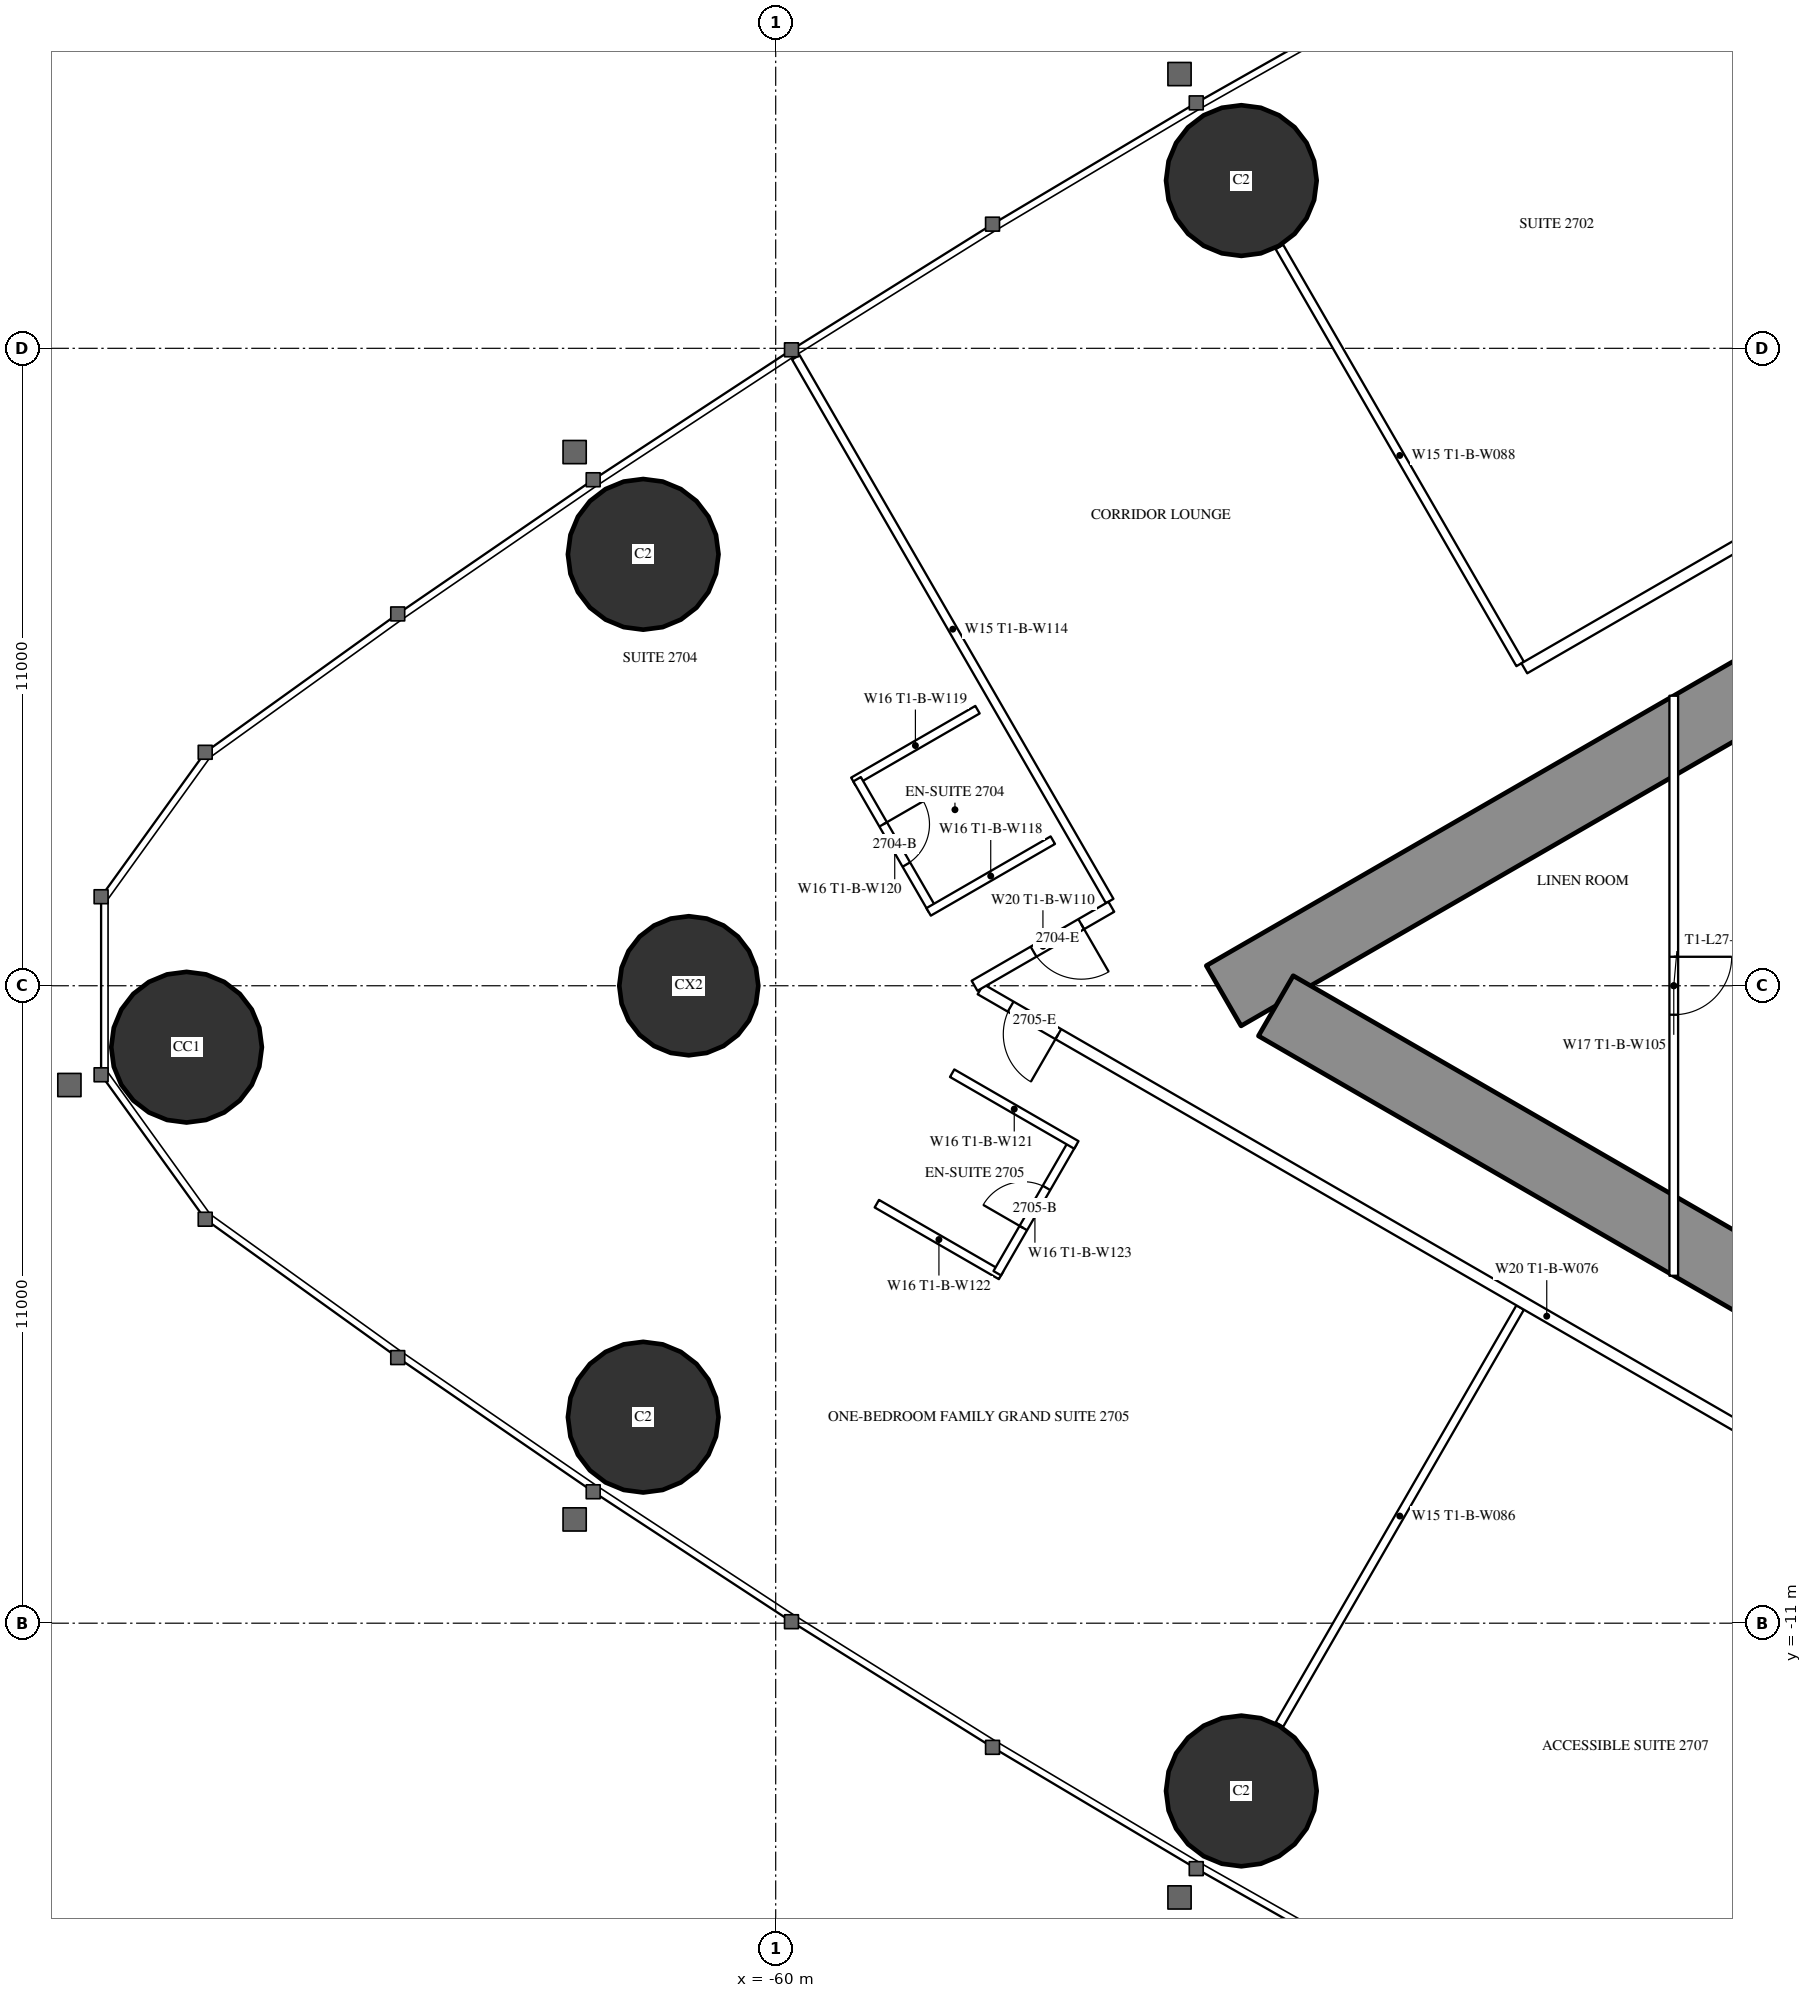
"""IFC4 building model, lengths in metres.
Left out: names, types, materials, properties, quantities, classifications, styles, units other than length and angle.
Written with IfcOpenShell. Run it as: python <this file> out.ifc"""

import sys

from ifc_helpers import new_model, si_unit, direction, frame, frame_2d, origin, origin_2d, place, context, subcontext, project, spatial, rectangle, circle, hollow_circle, extrude, element, fill, save


model = new_model("IFC4")
c1 = context("Model", 3, precision=1e-05, world=origin(), true_north=direction((0.0, 1.0)))
c2 = subcontext(c1, "Body", "Model", "MODEL_VIEW")
j1 = project(units=[si_unit("LENGTHUNIT", "METRE"), si_unit("PLANEANGLEUNIT", "RADIAN")], contexts=[c1])
p1 = place(None, origin())
s1 = spatial("IfcSite", under=j1, at=p1, CompositionType="ELEMENT")
p2 = place(p1, origin())
s2 = spatial("IfcBuilding", under=s1, at=p2, CompositionType="ELEMENT")
p3 = place(p2, frame((0.0, 0.0, 104.6)))
s3 = spatial("IfcBuildingStorey", under=s2, at=p3, CompositionType="ELEMENT", Elevation=104.6)
for number, where, z_axis, x_axis in (
    (1, (-70.168, -1.06, 0.0), (0.0, 0.0, 1.0), (1.0, 0.0, 0.0)),
    (2, (-62.287, -7.445, 0.0), (0.0, 0.0, 1.0), (1.0, 0.0, 0.0)),
    (3, (-51.963, -13.895, 0.0), (0.0, 0.0, 1.0), (1.0, 0.0, 0.0)),
    (4, (-51.963, 13.895, 0.0), (0.0, 0.0, 1.0), (1.0, 0.0, 0.0)),
    (5, (-62.287, 7.445, 0.0), (0.0, 0.0, 1.0), (1.0, 0.0, 0.0)),
):
    element("IfcColumn", number, at=place(p3, frame(where, z_axis=z_axis, x_axis=x_axis)), inside=s3, PredefinedType="COLUMN", context=c2, shape_type="SweptSolid", body=[
        extrude(hollow_circle(Radius=1.3, WallThickness=0.1, at=origin_2d()), origin(), (0.0, 0.0, 1.0), 3.5),
    ])
p4 = place(p3, frame((-61.5, 0.0, 0.0), z_axis=(0.0, 0.0, 1.0), x_axis=(1.0, 0.0, 0.0)))
e6 = element("IfcColumn", 6, at=p4, inside=s3, PredefinedType="COLUMN", context=c2, shape_type="SweptSolid", body=[
    extrude(circle(Radius=1.2, at=origin_2d()), origin(), (0.0, 0.0, 1.0), 3.5),
])
p5 = place(p3, frame((-27.2, 14.3, 0.0), z_axis=(0.0, 0.0, 1.0), x_axis=(-0.866026593062, -0.499997940104, 0.0)))
e7 = element("IfcWall", 7, at=p5, inside=s3, PredefinedType="SHEAR", context=c2, shape_type="SweptSolid", body=[
    extrude(rectangle(XDim=28.946, YDim=1.2, at=frame_2d((14.473, 0.0))), origin(), (0.0, 0.0, 1.0), 3.5),
])
p6 = place(p5, frame((4.6, 0.0, 0.0)))
e8 = element("IfcOpeningElement", 8, at=p6, cuts=e7, PredefinedType="OPENING", context=c2, shape_type="SweptSolid", body=[
    extrude(rectangle(XDim=1.0, YDim=2.2, at=frame_2d((0.5, 1.1))), frame((0.0, 0.61, 0.0), z_axis=(0.0, -1.0, 0.0), x_axis=(1.0, 0.0, 0.0)), (0.0, 0.0, 1.0), 1.22),
])
p7 = place(p5, frame((13.395, 0.0, 0.0)))
e9 = element("IfcOpeningElement", 9, at=p7, cuts=e7, PredefinedType="OPENING", context=c2, shape_type="SweptSolid", body=[
    extrude(rectangle(XDim=1.8, YDim=2.2, at=frame_2d((0.9, 1.1))), frame((0.0, 0.61, 0.0), z_axis=(0.0, -1.0, 0.0), x_axis=(1.0, 0.0, 0.0)), (0.0, 0.0, 1.0), 1.22),
])
p8 = place(p3, frame((-27.2, -14.3, 0.0), z_axis=(0.0, 0.0, 1.0), x_axis=(-0.866024021859, 0.500002393557, 0.0)))
e10 = element("IfcWall", 10, at=p8, inside=s3, PredefinedType="SHEAR", context=c2, shape_type="SweptSolid", body=[
    extrude(rectangle(XDim=27.907, YDim=1.2, at=frame_2d((13.954, 0.0))), origin(), (0.0, 0.0, 1.0), 3.5),
])
p9 = place(p8, frame((4.6, 0.0, 0.0)))
e11 = element("IfcOpeningElement", 11, at=p9, cuts=e10, PredefinedType="OPENING", context=c2, shape_type="SweptSolid", body=[
    extrude(rectangle(XDim=1.0, YDim=2.2, at=frame_2d((0.5, 1.1))), frame((0.0, 0.61, 0.0), z_axis=(0.0, -1.0, 0.0), x_axis=(1.0, 0.0, 0.0)), (0.0, 0.0, 1.0), 1.22),
])
p10 = place(p8, frame((13.395, 0.0, 0.0)))
e12 = element("IfcOpeningElement", 12, at=p10, cuts=e10, PredefinedType="OPENING", context=c2, shape_type="SweptSolid", body=[
    extrude(rectangle(XDim=1.8, YDim=2.2, at=frame_2d((0.9, 1.1))), frame((0.0, 0.61, 0.0), z_axis=(0.0, -1.0, 0.0), x_axis=(1.0, 0.0, 0.0)), (0.0, 0.0, 1.0), 1.22),
])
p11 = place(p3, frame((-47.151, 5.552, 0.0), z_axis=(0.0, 0.0, 1.0), x_axis=(-0.500003012045, 0.866023664773, 0.0)))
e13 = element("IfcWall", 13, at=p11, inside=s3, PredefinedType="PARTITIONING", context=c2, shape_type="SweptSolid", body=[
    extrude(rectangle(XDim=8.311, YDim=0.15, at=frame_2d((4.156, 0.0))), origin(), (0.0, 0.0, 1.0), 2.2),
])
p12 = place(p3, frame((-54.236, 1.462, 0.0), z_axis=(0.0, 0.0, 1.0), x_axis=(-0.499990351854, 0.866030974073, 0.0)))
e14 = element("IfcWall", 14, at=p12, inside=s3, PredefinedType="PARTITIONING", context=c2, shape_type="SweptSolid", body=[
    extrude(rectangle(XDim=10.834, YDim=0.15, at=frame_2d((5.417, 0.0))), origin(), (0.0, 0.0, 1.0), 3.25),
])
p13 = place(p3, frame((-47.151, -5.552, 0.0), z_axis=(0.0, 0.0, 1.0), x_axis=(-0.500003012045, -0.866023664773, 0.0)))
e15 = element("IfcWall", 15, at=p13, inside=s3, PredefinedType="PARTITIONING", context=c2, shape_type="SweptSolid", body=[
    extrude(rectangle(XDim=8.311, YDim=0.15, at=frame_2d((4.156, 0.0))), origin(), (0.0, 0.0, 1.0), 2.2),
])
p14 = place(p3, frame((-36.92, -11.344, 0.0), z_axis=(0.0, 0.0, 1.0), x_axis=(-0.866028313256, 0.499994960614, 0.0)))
e16 = element("IfcWall", 16, at=p14, inside=s3, PredefinedType="PARTITIONING", context=c2, shape_type="SweptSolid", body=[
    extrude(rectangle(XDim=22.568, YDim=0.2, at=frame_2d((11.284, 0.0))), origin(), (0.0, 0.0, 1.0), 3.25),
])
p15 = place(p14, frame((21.018, 0.0, 0.0)))
e17 = element("IfcOpeningElement", 17, at=p15, cuts=e16, PredefinedType="OPENING", context=c2, shape_type="SweptSolid", body=[
    extrude(rectangle(XDim=0.95, YDim=2.2, at=frame_2d((0.475, 1.1))), frame((0.0, 0.11, 0.0), z_axis=(0.0, -1.0, 0.0), x_axis=(1.0, 0.0, 0.0)), (0.0, 0.0, 1.0), 0.22),
])
p16 = place(p14, frame((3.35, 0.0, 0.0)))
e18 = element("IfcOpeningElement", 18, at=p16, cuts=e16, PredefinedType="OPENING", context=c2, shape_type="SweptSolid", body=[
    extrude(rectangle(XDim=1.0, YDim=2.2, at=frame_2d((0.5, 1.1))), frame((0.0, 0.11, 0.0), z_axis=(0.0, -1.0, 0.0), x_axis=(1.0, 0.0, 0.0)), (0.0, 0.0, 1.0), 0.22),
])
p17 = place(p3, frame((-37.7, 10.894, 0.0), z_axis=(0.0, 0.0, 1.0), x_axis=(-0.866027551079, -0.499996280759, 0.0)))
e19 = element("IfcWall", 19, at=p17, inside=s3, PredefinedType="PARTITIONING", context=c2, shape_type="SweptSolid", body=[
    extrude(rectangle(XDim=10.831, YDim=0.2, at=frame_2d((5.415, 0.0))), origin(), (0.0, 0.0, 1.0), 3.25),
])
p18 = place(p17, frame((0.6, 0.0, 0.0)))
e20 = element("IfcOpeningElement", 20, at=p18, cuts=e19, PredefinedType="OPENING", context=c2, shape_type="SweptSolid", body=[
    extrude(rectangle(XDim=0.95, YDim=2.2, at=frame_2d((0.475, 1.1))), frame((0.0, 0.11, 0.0), z_axis=(0.0, -1.0, 0.0), x_axis=(1.0, 0.0, 0.0)), (0.0, 0.0, 1.0), 0.22),
])
p19 = place(p3, frame((-54.207, 1.363, 0.0), z_axis=(0.0, 0.0, 1.0), x_axis=(-0.866046902845, -0.499962760685, 0.0)))
e21 = element("IfcWall", 21, at=p19, inside=s3, PredefinedType="PARTITIONING", context=c2, shape_type="SweptSolid", body=[
    extrude(rectangle(XDim=2.726, YDim=0.2, at=frame_2d((1.363, 0.0))), origin(), (0.0, 0.0, 1.0), 3.25),
])
p20 = place(p19, frame((0.6, 0.0, 0.0)))
e22 = element("IfcOpeningElement", 22, at=p20, cuts=e21, PredefinedType="OPENING", context=c2, shape_type="SweptSolid", body=[
    extrude(rectangle(XDim=0.95, YDim=2.2, at=frame_2d((0.475, 1.1))), frame((0.0, 0.11, 0.0), z_axis=(0.0, -1.0, 0.0), x_axis=(1.0, 0.0, 0.0)), (0.0, 0.0, 1.0), 0.22),
])
p21 = place(p3, frame((-56.517, 4.764, 0.0), z_axis=(0.0, 0.0, 1.0), x_axis=(-0.866031185235, -0.4999899861, 0.0)))
e23 = element("IfcWall", 23, at=p21, inside=s3, PredefinedType="PARTITIONING", context=c2, shape_type="SweptSolid", body=[
    extrude(rectangle(XDim=2.475, YDim=0.15, at=frame_2d((1.238, 0.0))), origin(), (0.0, 0.0, 1.0), 3.25),
])
p22 = place(p3, frame((-57.296, 1.312, 0.0), z_axis=(0.0, 0.0, 1.0), x_axis=(-0.49997716683, 0.86603858612, 0.0)))
e24 = element("IfcWall", 24, at=p22, inside=s3, PredefinedType="PARTITIONING", context=c2, shape_type="SweptSolid", body=[
    extrude(rectangle(XDim=2.6, YDim=0.15, at=frame_2d((1.3, 0.0))), origin(), (0.0, 0.0, 1.0), 3.25),
])
p23 = place(p22, frame((0.9, 0.0, 0.0)))
e25 = element("IfcOpeningElement", 25, at=p23, cuts=e24, PredefinedType="OPENING", context=c2, shape_type="SweptSolid", body=[
    extrude(rectangle(XDim=0.8, YDim=2.2, at=frame_2d((0.4, 1.1))), frame((0.0, 0.085, 0.0), z_axis=(0.0, -1.0, 0.0), x_axis=(1.0, 0.0, 0.0)), (0.0, 0.0, 1.0), 0.17),
])
for number, where, z_axis, x_axis in (
    (26, (-55.217, 2.512, 0.0), (0.0, 0.0, 1.0), (-0.866, -0.5, 0.0)),
    (27, (-56.111, -4.998, 0.0), (0.0, 0.0, 1.0), (-0.866, 0.5, 0.0)),
):
    element("IfcWall", number, at=place(p3, frame(where, z_axis=z_axis, x_axis=x_axis)), inside=s3, PredefinedType="PARTITIONING", context=c2, shape_type="SweptSolid", body=[
        extrude(rectangle(XDim=2.475, YDim=0.15, at=frame_2d((1.238, 0.0))), origin(), (0.0, 0.0, 1.0), 3.25),
    ])
p24 = place(p3, frame((-54.876, -2.709, 0.0), z_axis=(0.0, 0.0, 1.0), x_axis=(-0.500006934395, -0.866021400173, 0.0)))
e28 = element("IfcWall", 28, at=p24, inside=s3, PredefinedType="PARTITIONING", context=c2, shape_type="SweptSolid", body=[
    extrude(rectangle(XDim=2.6, YDim=0.15, at=frame_2d((1.3, 0.0))), origin(), (0.0, 0.0, 1.0), 3.25),
])
p25 = place(p24, frame((0.9, 0.0, 0.0)))
e29 = element("IfcOpeningElement", 29, at=p25, cuts=e28, PredefinedType="OPENING", context=c2, shape_type="SweptSolid", body=[
    extrude(rectangle(XDim=0.8, YDim=2.2, at=frame_2d((0.4, 1.1))), frame((0.0, 0.085, 0.0), z_axis=(0.0, -1.0, 0.0), x_axis=(1.0, 0.0, 0.0)), (0.0, 0.0, 1.0), 0.17),
])
p26 = place(p3, frame((-54.811, -2.747, 0.0), z_axis=(0.0, 0.0, 1.0), x_axis=(-0.866031185235, 0.4999899861, 0.0)))
e30 = element("IfcWall", 30, at=p26, inside=s3, PredefinedType="PARTITIONING", context=c2, shape_type="SweptSolid", body=[
    extrude(rectangle(XDim=2.475, YDim=0.15, at=frame_2d((1.238, 0.0))), origin(), (0.0, 0.0, 1.0), 3.25),
])
p27 = place(p3, frame((-44.5, 5.005, 0.0), z_axis=(0.0, 0.0, 1.0), x_axis=(0.0, -1.0, 0.0)))
e31 = element("IfcWall", 31, at=p27, inside=s3, PredefinedType="PARTITIONING", context=c2, shape_type="SweptSolid", body=[
    extrude(rectangle(XDim=10.009, YDim=0.15, at=frame_2d((5.005, 0.0))), origin(), (0.0, 0.0, 1.0), 2.45),
])
p28 = place(p27, frame((4.505, 0.0, 0.0)))
e32 = element("IfcOpeningElement", 32, at=p28, cuts=e31, PredefinedType="OPENING", context=c2, shape_type="SweptSolid", body=[
    extrude(rectangle(XDim=1.0, YDim=2.2, at=frame_2d((0.5, 1.1))), frame((0.0, 0.085, 0.0), z_axis=(0.0, -1.0, 0.0), x_axis=(1.0, 0.0, 0.0)), (0.0, 0.0, 1.0), 0.17),
])
p29 = place(p23, origin())
e33 = element("IfcDoor", 33, at=p29, inside=s3, OperationType="SINGLE_SWING_RIGHT", PredefinedType="DOOR", context=c2, shape_type="SweptSolid", body=[
    extrude(rectangle(XDim=0.8, YDim=2.2, at=frame_2d((0.4, 1.1))), frame((0.0, 0.025, 0.0), z_axis=(0.0, -1.0, 0.0), x_axis=(1.0, 0.0, 0.0)), (0.0, 0.0, 1.0), 0.05),
])
fill(e25, e33)
p30 = place(p20, origin())
e34 = element("IfcDoor", 34, at=p30, inside=s3, OperationType="SINGLE_SWING_LEFT", PredefinedType="DOOR", context=c2, shape_type="SweptSolid", body=[
    extrude(rectangle(XDim=0.95, YDim=2.2, at=frame_2d((0.475, 1.1))), frame((0.0, 0.025, 0.0), z_axis=(0.0, -1.0, 0.0), x_axis=(1.0, 0.0, 0.0)), (0.0, 0.0, 1.0), 0.05),
])
fill(e22, e34)
p31 = place(p25, origin())
e35 = element("IfcDoor", 35, at=p31, inside=s3, OperationType="SINGLE_SWING_RIGHT", PredefinedType="DOOR", context=c2, shape_type="SweptSolid", body=[
    extrude(rectangle(XDim=0.8, YDim=2.2, at=frame_2d((0.4, 1.1))), frame((0.0, 0.025, 0.0), z_axis=(0.0, -1.0, 0.0), x_axis=(1.0, 0.0, 0.0)), (0.0, 0.0, 1.0), 0.05),
])
fill(e29, e35)
p32 = place(p15, origin())
e36 = element("IfcDoor", 36, at=p32, inside=s3, OperationType="SINGLE_SWING_LEFT", PredefinedType="DOOR", context=c2, shape_type="SweptSolid", body=[
    extrude(rectangle(XDim=0.95, YDim=2.2, at=frame_2d((0.475, 1.1))), frame((0.0, 0.025, 0.0), z_axis=(0.0, -1.0, 0.0), x_axis=(1.0, 0.0, 0.0)), (0.0, 0.0, 1.0), 0.05),
])
fill(e17, e36)
p33 = place(p28, origin())
e37 = element("IfcDoor", 37, at=p33, inside=s3, OperationType="SINGLE_SWING_LEFT", PredefinedType="DOOR", context=c2, shape_type="SweptSolid", body=[
    extrude(rectangle(XDim=1.0, YDim=2.2, at=frame_2d((0.5, 1.1))), frame((0.0, 0.025, 0.0), z_axis=(0.0, -1.0, 0.0), x_axis=(1.0, 0.0, 0.0)), (0.0, 0.0, 1.0), 0.05),
])
fill(e32, e37)
save(model, sys.argv[1])
